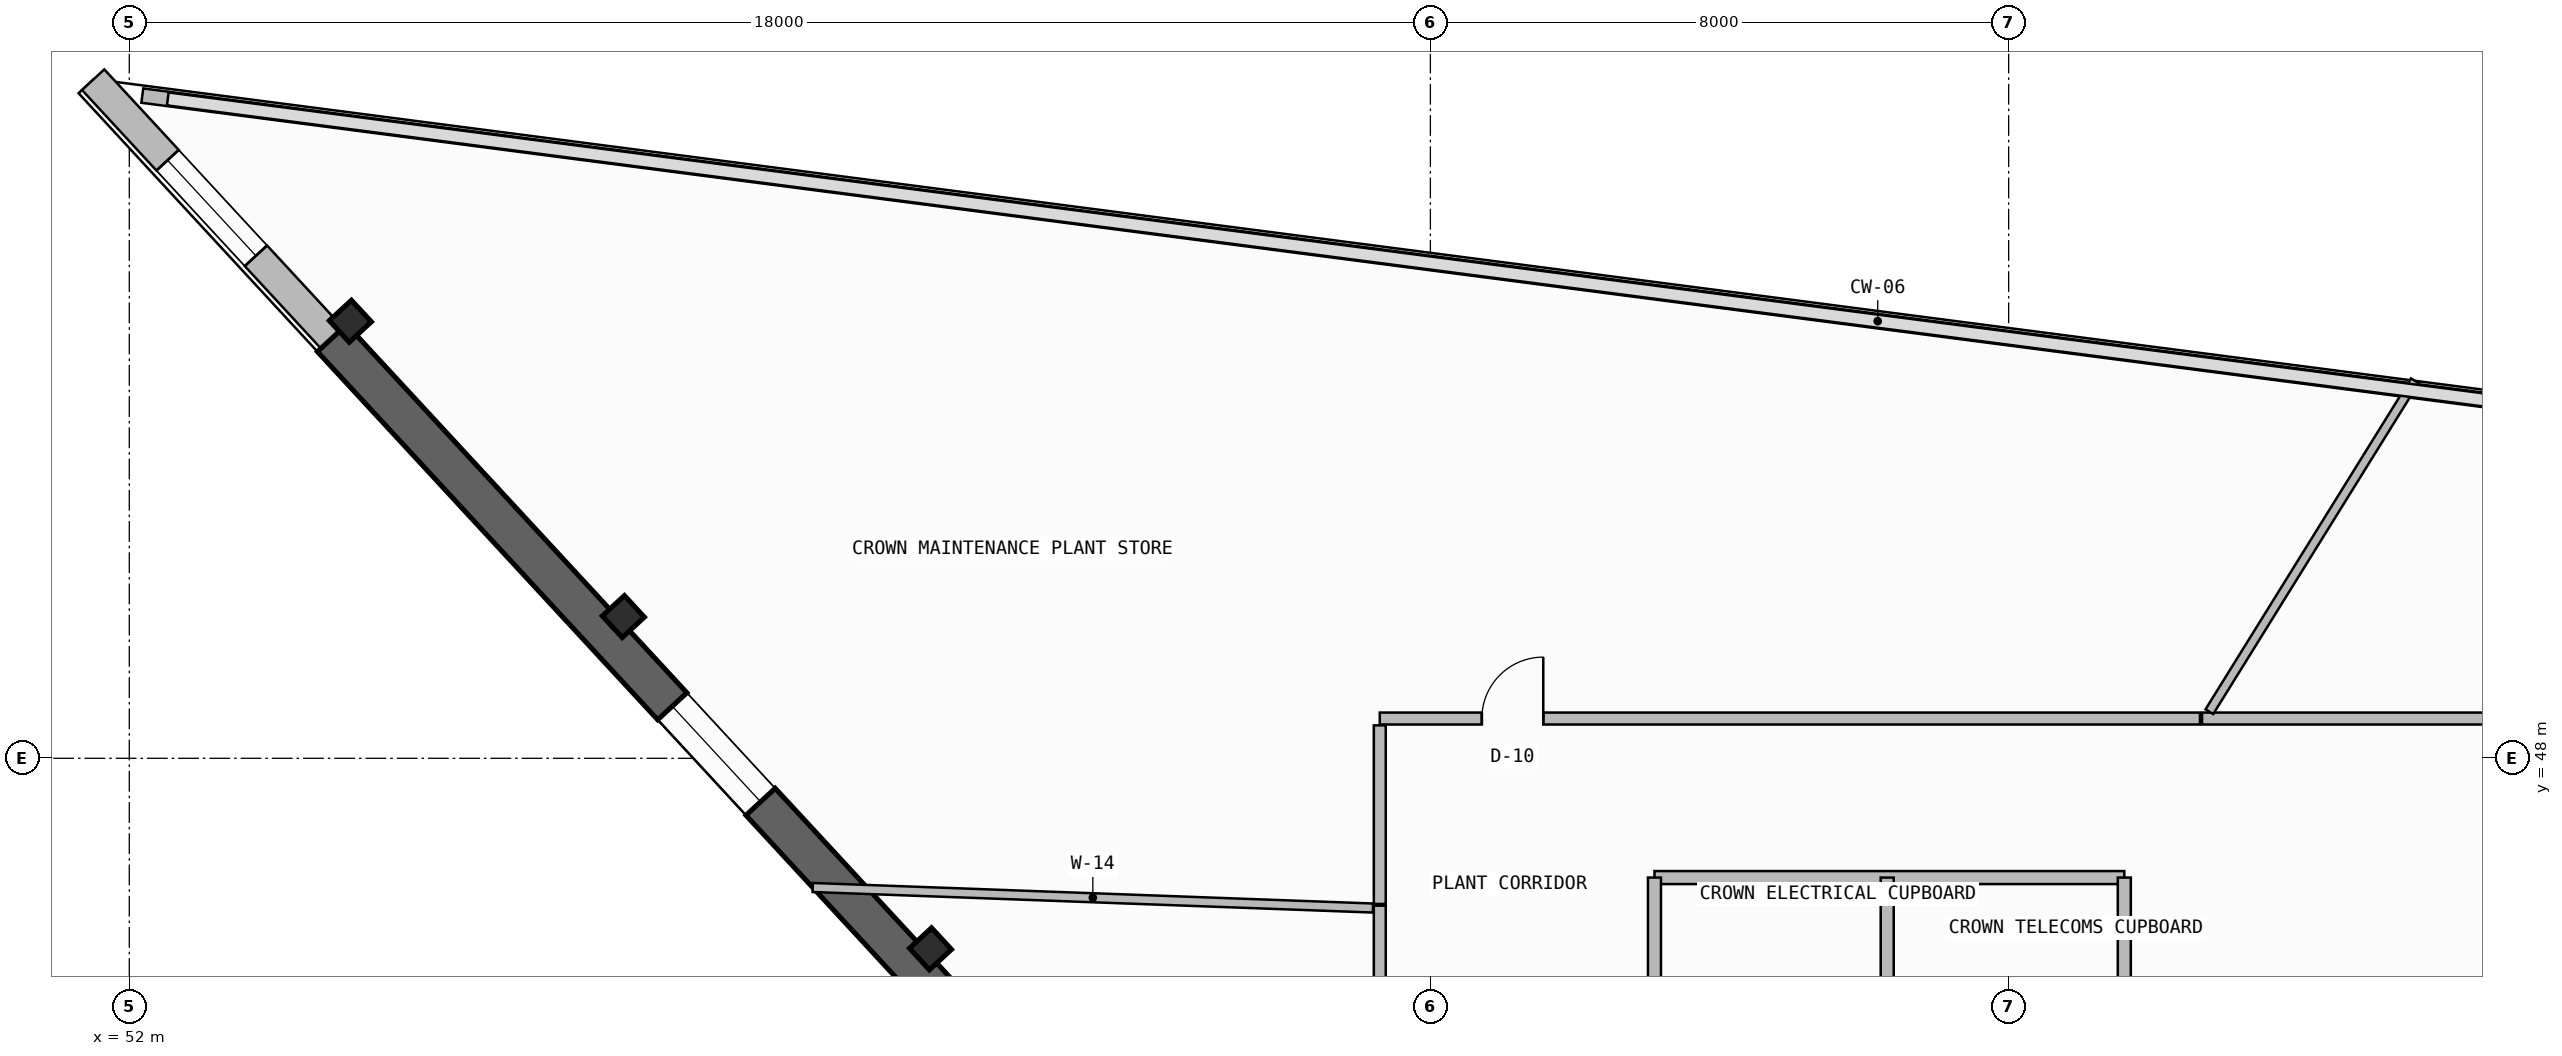
"""IFC4 building model, lengths in metres.
Left out: names, types, materials, properties, quantities, classifications, styles, units other than length and angle.
Written with IfcOpenShell. Run it as: python <this file> out.ifc"""

import sys

from ifc_helpers import new_model, si_unit, direction, frame, frame_2d, origin, origin_2d, place, context, subcontext, project, spatial, polyline, rectangle, i_section, outline, extrude, element, fill, save


model = new_model("IFC4")
c1 = context("Model", 3, precision=1e-05, world=origin(), true_north=direction((0.0, 1.0)))
c2 = subcontext(c1, "Body", "Model", "MODEL_VIEW")
j1 = project(units=[si_unit("LENGTHUNIT", "METRE"), si_unit("PLANEANGLEUNIT", "RADIAN")], contexts=[c1])
p1 = place(None, origin())
s1 = spatial("IfcSite", under=j1, at=p1, CompositionType="ELEMENT")
p2 = place(p1, origin())
s2 = spatial("IfcBuilding", under=s1, at=p2, CompositionType="ELEMENT")
p3 = place(p2, frame((0.0, 0.0, 312.58)))
s3 = spatial("IfcBuildingStorey", under=s2, at=p3, CompositionType="ELEMENT", Elevation=312.58)
p4 = place(p3, frame((55.058, 54.046, 0.0), z_axis=(0.0, 0.0, 1.0), x_axis=(-0.678800745533, 0.734322509436, 0.0)))
e1 = element("IfcColumn", 1, at=p4, inside=s3, PredefinedType="COLUMN", context=c2, shape_type="SweptSolid", body=[
    extrude(i_section(OverallWidth=0.406, OverallDepth=0.416, WebThickness=0.03, FlangeThickness=0.048, FilletRadius=0.015, at=origin_2d()), origin(), (0.0, 0.0, 1.0), 3.437),
])
for number, where, z_axis, x_axis in (
    (2, (58.835, 49.961, 0.0), (0.0, 0.0, 1.0), (-0.679, 0.734, 0.0)),
    (3, (63.084, 45.364, 0.0), (0.0, 0.0, 1.0), (-0.679, 0.734, 0.0)),
):
    element("IfcColumn", number, at=place(p3, frame(where, z_axis=z_axis, x_axis=x_axis)), inside=s3, PredefinedType="COLUMN", context=c2, shape_type="SweptSolid", body=[
        extrude(i_section(OverallWidth=0.406, OverallDepth=0.416, WebThickness=0.03, FlangeThickness=0.048, FilletRadius=0.015, at=origin_2d()), origin(), (0.0, 0.0, 1.0), 4.8),
    ])
p5 = place(p3, frame((51.5, 57.387, 0.0), z_axis=(0.0, 0.0, 1.0), x_axis=(0.67880684669, -0.734316869537, 0.0)))
e4 = element("IfcWall", 4, at=p5, inside=s3, PredefinedType="SOLIDWALL", context=c2, shape_type="SweptSolid", body=[
    extrude(outline(polyline([(0.0, 0.0), (4.869, 0.0), (4.868, 3.555), (0.0, 2.166), (0.0, 0.0)])), frame((0.0, 0.21, 0.0), z_axis=(0.0, -1.0, 0.0), x_axis=(1.0, 0.0, 0.0)), (0.0, 0.0, 1.0), 0.42),
])
p6 = place(p5, frame((1.517, 0.0, 0.7)))
e5 = element("IfcOpeningElement", 5, at=p6, cuts=e4, PredefinedType="OPENING", context=c2, shape_type="SweptSolid", body=[
    extrude(rectangle(XDim=1.8, YDim=1.2, at=frame_2d((0.9, 0.6))), frame((0.0, 0.22, 0.0), z_axis=(0.0, -1.0, 0.0), x_axis=(1.0, 0.0, 0.0)), (0.0, 0.0, 1.0), 0.44),
])
p7 = place(p3, frame((54.805, 53.812, -0.2), z_axis=(0.0, 0.0, 1.0), x_axis=(0.678803115619, -0.734320318543, 0.0)))
e6 = element("IfcWall", 6, at=p7, inside=s3, PredefinedType="SHEAR", context=c2, shape_type="SweptSolid", body=[
    extrude(outline(polyline([(0.0, 0.0), (18.083, 0.0), (18.083, 4.8), (0.0, 3.755), (0.0, 0.0)])), frame((0.0, 0.275, 0.0), z_axis=(0.0, -1.0, 0.0), x_axis=(1.0, 0.0, 0.0)), (0.0, 0.0, 1.0), 0.55),
])
p8 = place(p7, frame((6.934, 0.0, 0.7)))
e7 = element("IfcOpeningElement", 7, at=p8, cuts=e6, PredefinedType="OPENING", context=c2, shape_type="SweptSolid", body=[
    extrude(rectangle(XDim=1.8, YDim=1.2, at=frame_2d((0.9, 0.6))), frame((0.0, 0.285, 0.0), z_axis=(0.0, -1.0, 0.0), x_axis=(1.0, 0.0, 0.0)), (0.0, 0.0, 1.0), 0.57),
])
p9 = place(p3, frame((52.18, 57.167, 0.0), z_axis=(0.0, 0.0, 1.0), x_axis=(0.991658680797, -0.128891663035, 0.0)))
e8 = element("IfcWall", 8, at=p9, inside=s3, PredefinedType="PARAPET", context=c2, shape_type="SweptSolid", body=[
    extrude(rectangle(XDim=48.185, YDim=0.2, at=frame_2d((24.093, 0.0))), origin(), (0.0, 0.0, 1.0), 1.15),
])
p10 = place(p3, frame((73.1, 46.35, 0.0), z_axis=(0.0, 0.0, 1.0), x_axis=(1.0, 0.0, 0.0)))
e9 = element("IfcWall", 9, at=p10, inside=s3, PredefinedType="PLUMBINGWALL", context=c2, shape_type="SweptSolid", body=[
    extrude(rectangle(XDim=6.5, YDim=0.18, at=frame_2d((3.25, 0.0))), origin(), (0.0, 0.0, 1.0), 4.6),
])
for number, where, z_axis, x_axis in (
    (10, (73.1, 43.75, 0.0), (0.0, 0.0, 1.0), (0.0, 1.0, 0.0)),
    (11, (79.6, 43.75, 0.0), (0.0, 0.0, 1.0), (0.0, 1.0, 0.0)),
    (12, (76.32, 43.75, 0.0), (0.0, 0.0, 1.0), (0.0, 1.0, 0.0)),
):
    element("IfcWall", number, at=place(p3, frame(where, z_axis=z_axis, x_axis=x_axis)), inside=s3, PredefinedType="PLUMBINGWALL", context=c2, shape_type="SweptSolid", body=[
        extrude(rectangle(XDim=2.6, YDim=0.18, at=frame_2d((1.3, 0.0))), origin(), (0.0, 0.0, 1.0), 4.6),
    ])
p11 = place(p3, frame((69.3, 45.961, 0.0), z_axis=(0.0, 0.0, 1.0), x_axis=(0.0, -1.0, 0.0)))
e13 = element("IfcWall", 13, at=p11, inside=s3, PredefinedType="PARTITIONING", context=c2, shape_type="SweptSolid", body=[
    extrude(rectangle(XDim=7.852, YDim=0.165, at=frame_2d((3.926, 0.0))), origin(), (0.0, 0.0, 1.0), 4.6),
])
p12 = place(p11, frame((2.283, 0.0, 0.0)))
e14 = element("IfcOpeningElement", 14, at=p12, cuts=e13, PredefinedType="OPENING", context=c2, shape_type="SweptSolid", body=[
    extrude(rectangle(XDim=1.5, YDim=2.25, at=frame_2d((0.75, 1.125))), frame((0.0, 0.093, 0.0), z_axis=(0.0, -1.0, 0.0), x_axis=(1.0, 0.0, 0.0)), (0.0, 0.0, 1.0), 0.185),
])
p13 = place(p3, frame((61.455, 46.213, 0.0), z_axis=(0.0, 0.0, 1.0), x_axis=(0.999328477897, -0.036641414612, 0.0)))
e15 = element("IfcWall", 15, at=p13, inside=s3, PredefinedType="PARTITIONING", context=c2, shape_type="SweptSolid", body=[
    extrude(rectangle(XDim=7.756, YDim=0.125, at=frame_2d((3.878, 0.0))), origin(), (0.0, 0.0, 1.0), 4.6),
])
p14 = place(p3, frame((88.355, 48.55, 0.0), z_axis=(0.0, 0.0, 1.0), x_axis=(-1.0, 0.0, 0.0)))
e16 = element("IfcWall", 16, at=p14, inside=s3, PredefinedType="PARTITIONING", context=c2, shape_type="SweptSolid", body=[
    extrude(rectangle(XDim=7.68, YDim=0.165, at=frame_2d((3.84, 0.0))), origin(), (0.0, 0.0, 1.0), 2.12),
])
p15 = place(p14, frame((2.45, 0.0, 0.0)))
e17 = element("IfcOpeningElement", 17, at=p15, cuts=e16, PredefinedType="OPENING", context=c2, shape_type="SweptSolid", body=[
    extrude(rectangle(XDim=0.85, YDim=2.05, at=frame_2d((0.425, 1.025))), frame((0.0, 0.093, 0.0), z_axis=(0.0, -1.0, 0.0), x_axis=(1.0, 0.0, 0.0)), (0.0, 0.0, 1.0), 0.185),
])
p16 = place(p3, frame((80.777, 48.645, 0.0), z_axis=(0.0, 0.0, 1.0), x_axis=(0.527561345101, 0.849516937533, 0.0)))
e18 = element("IfcWall", 18, at=p16, inside=s3, PredefinedType="PARTITIONING", context=c2, shape_type="SweptSolid", body=[
    extrude(rectangle(XDim=5.388, YDim=0.125, at=frame_2d((2.694, 0.0))), origin(), (0.0, 0.0, 1.0), 2.12),
])
p17 = place(p3, frame((80.647, 48.55, 0.0), z_axis=(0.0, 0.0, 1.0), x_axis=(-1.0, 0.0, 0.0)))
e19 = element("IfcWall", 19, at=p17, inside=s3, PredefinedType="PARTITIONING", context=c2, shape_type="SweptSolid", body=[
    extrude(rectangle(XDim=11.347, YDim=0.165, at=frame_2d((5.674, 0.0))), origin(), (0.0, 0.0, 1.0), 2.12),
])
p18 = place(p17, frame((9.085, 0.0, 0.0)))
e20 = element("IfcOpeningElement", 20, at=p18, cuts=e19, PredefinedType="OPENING", context=c2, shape_type="SweptSolid", body=[
    extrude(rectangle(XDim=0.85, YDim=2.05, at=frame_2d((0.425, 1.025))), frame((0.0, 0.093, 0.0), z_axis=(0.0, -1.0, 0.0), x_axis=(1.0, 0.0, 0.0)), (0.0, 0.0, 1.0), 0.185),
])
p19 = place(p3, frame((69.3, 48.456, 0.0), z_axis=(0.0, 0.0, 1.0), x_axis=(0.0, -1.0, 0.0)))
e21 = element("IfcWall", 21, at=p19, inside=s3, PredefinedType="PARTITIONING", context=c2, shape_type="SweptSolid", body=[
    extrude(rectangle(XDim=2.47, YDim=0.165, at=frame_2d((1.235, 0.0))), origin(), (0.0, 0.0, 1.0), 2.12),
])
p20 = place(p6, origin())
e22 = element("IfcWindow", 22, at=p20, inside=s3, PartitioningType="SINGLE_PANEL", PredefinedType="WINDOW", context=c2, shape_type="SweptSolid", body=[
    extrude(rectangle(XDim=1.8, YDim=1.2, at=frame_2d((0.9, 0.6))), frame((0.0, 0.03, 0.0), z_axis=(0.0, -1.0, 0.0), x_axis=(1.0, 0.0, 0.0)), (0.0, 0.0, 1.0), 0.06),
])
fill(e5, e22)
p21 = place(p8, origin())
e23 = element("IfcWindow", 23, at=p21, inside=s3, PartitioningType="SINGLE_PANEL", PredefinedType="WINDOW", context=c2, shape_type="SweptSolid", body=[
    extrude(rectangle(XDim=1.8, YDim=1.2, at=frame_2d((0.9, 0.6))), frame((0.0, 0.03, 0.0), z_axis=(0.0, -1.0, 0.0), x_axis=(1.0, 0.0, 0.0)), (0.0, 0.0, 1.0), 0.06),
])
fill(e7, e23)
p22 = place(p18, frame((0.85, 0.0, 0.0), z_axis=(0.0, 0.0, 1.0), x_axis=(-1.0, 0.0, 0.0)))
e24 = element("IfcDoor", 24, at=p22, inside=s3, OperationType="SINGLE_SWING_RIGHT", PredefinedType="DOOR", context=c2, shape_type="SweptSolid", body=[
    extrude(rectangle(XDim=0.85, YDim=2.05, at=frame_2d((0.425, 1.025))), frame((0.0, 0.025, 0.0), z_axis=(0.0, -1.0, 0.0), x_axis=(1.0, 0.0, 0.0)), (0.0, 0.0, 1.0), 0.05),
])
fill(e20, e24)
save(model, sys.argv[1])
